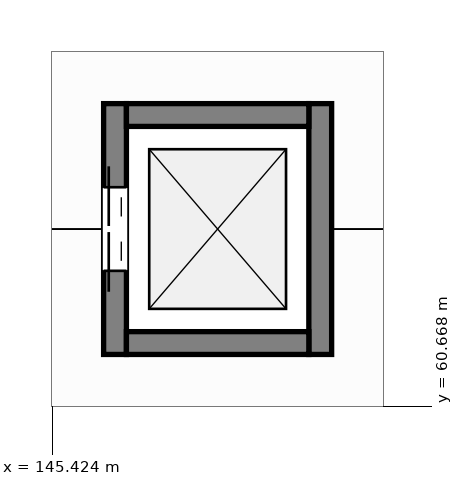
"""IFC4 building model, lengths in metres.
Left out: names, types, materials, properties, quantities, classifications, styles, units other than length and angle.
Written with IfcOpenShell. Run it as: python <this file> out.ifc"""

import sys

from ifc_helpers import new_model, si_unit, direction, frame, frame_2d, origin, place, context, subcontext, project, spatial, rectangle, extrude, element, fill, save


model = new_model("IFC4")
c1 = context("Model", 3, precision=1e-05, world=origin(), true_north=direction((0.0, 1.0)))
c2 = subcontext(c1, "Body", "Model", "MODEL_VIEW")
j1 = project(units=[si_unit("LENGTHUNIT", "METRE"), si_unit("PLANEANGLEUNIT", "RADIAN")], contexts=[c1])
p1 = place(None, origin())
s1 = spatial("IfcSite", under=j1, at=p1, CompositionType="ELEMENT")
p2 = place(p1, origin())
s2 = spatial("IfcBuilding", under=s1, at=p2, CompositionType="ELEMENT")
p3 = place(p2, frame((0.0, 0.0, 4.8)))
s3 = spatial("IfcBuildingStorey", under=s2, at=p3, CompositionType="ELEMENT", Elevation=4.8)
p4 = place(p3, frame((146.25, 61.35, 0.0), z_axis=(0.0, 0.0, 1.0), x_axis=(0.0, 1.0, 0.0)))
e1 = element("IfcWall", 1, at=p4, inside=s3, PredefinedType="SHEAR", context=c2, shape_type="SweptSolid", body=[
    extrude(rectangle(XDim=3.3, YDim=0.3, at=frame_2d((1.65, 0.0))), origin(), (0.0, 0.0, 1.0), 3.98),
])
p5 = place(p4, frame((1.1, 0.0, 0.0)))
e2 = element("IfcOpeningElement", 2, at=p5, cuts=e1, PredefinedType="OPENING", context=c2, shape_type="SweptSolid", body=[
    extrude(rectangle(XDim=1.1, YDim=2.15, at=frame_2d((0.55, 1.075))), frame((0.0, 0.16, 0.0), z_axis=(0.0, -1.0, 0.0), x_axis=(1.0, 0.0, 0.0)), (0.0, 0.0, 1.0), 0.32),
])
p6 = place(p3, frame((148.95, 61.35, 0.0), z_axis=(0.0, 0.0, 1.0), x_axis=(0.0, 1.0, 0.0)))
e3 = element("IfcWall", 3, at=p6, inside=s3, PredefinedType="SHEAR", context=c2, shape_type="SweptSolid", body=[
    extrude(rectangle(XDim=3.3, YDim=0.3, at=frame_2d((1.65, 0.0))), origin(), (0.0, 0.0, 1.0), 3.98),
])
for number, where, z_axis, x_axis in (
    (4, (146.4, 64.5, 0.0), (0.0, 0.0, 1.0), (1.0, 0.0, 0.0)),
    (5, (146.4, 61.5, 0.0), (0.0, 0.0, 1.0), (1.0, 0.0, 0.0)),
):
    element("IfcWall", number, at=place(p3, frame(where, z_axis=z_axis, x_axis=x_axis)), inside=s3, PredefinedType="SHEAR", context=c2, shape_type="SweptSolid", body=[
        extrude(rectangle(XDim=2.4, YDim=0.3, at=frame_2d((1.2, 0.0))), origin(), (0.0, 0.0, 1.0), 3.98),
    ])
p7 = place(p5, origin())
e6 = element("IfcDoor", 6, at=p7, inside=s3, OperationType="DOUBLE_DOOR_SLIDING", PredefinedType="DOOR", context=c2, shape_type="SweptSolid", body=[
    extrude(rectangle(XDim=1.1, YDim=2.15, at=frame_2d((0.55, 1.075))), frame((0.0, 0.025, 0.0), z_axis=(0.0, -1.0, 0.0), x_axis=(1.0, 0.0, 0.0)), (0.0, 0.0, 1.0), 0.05),
])
fill(e2, e6)
save(model, sys.argv[1])
